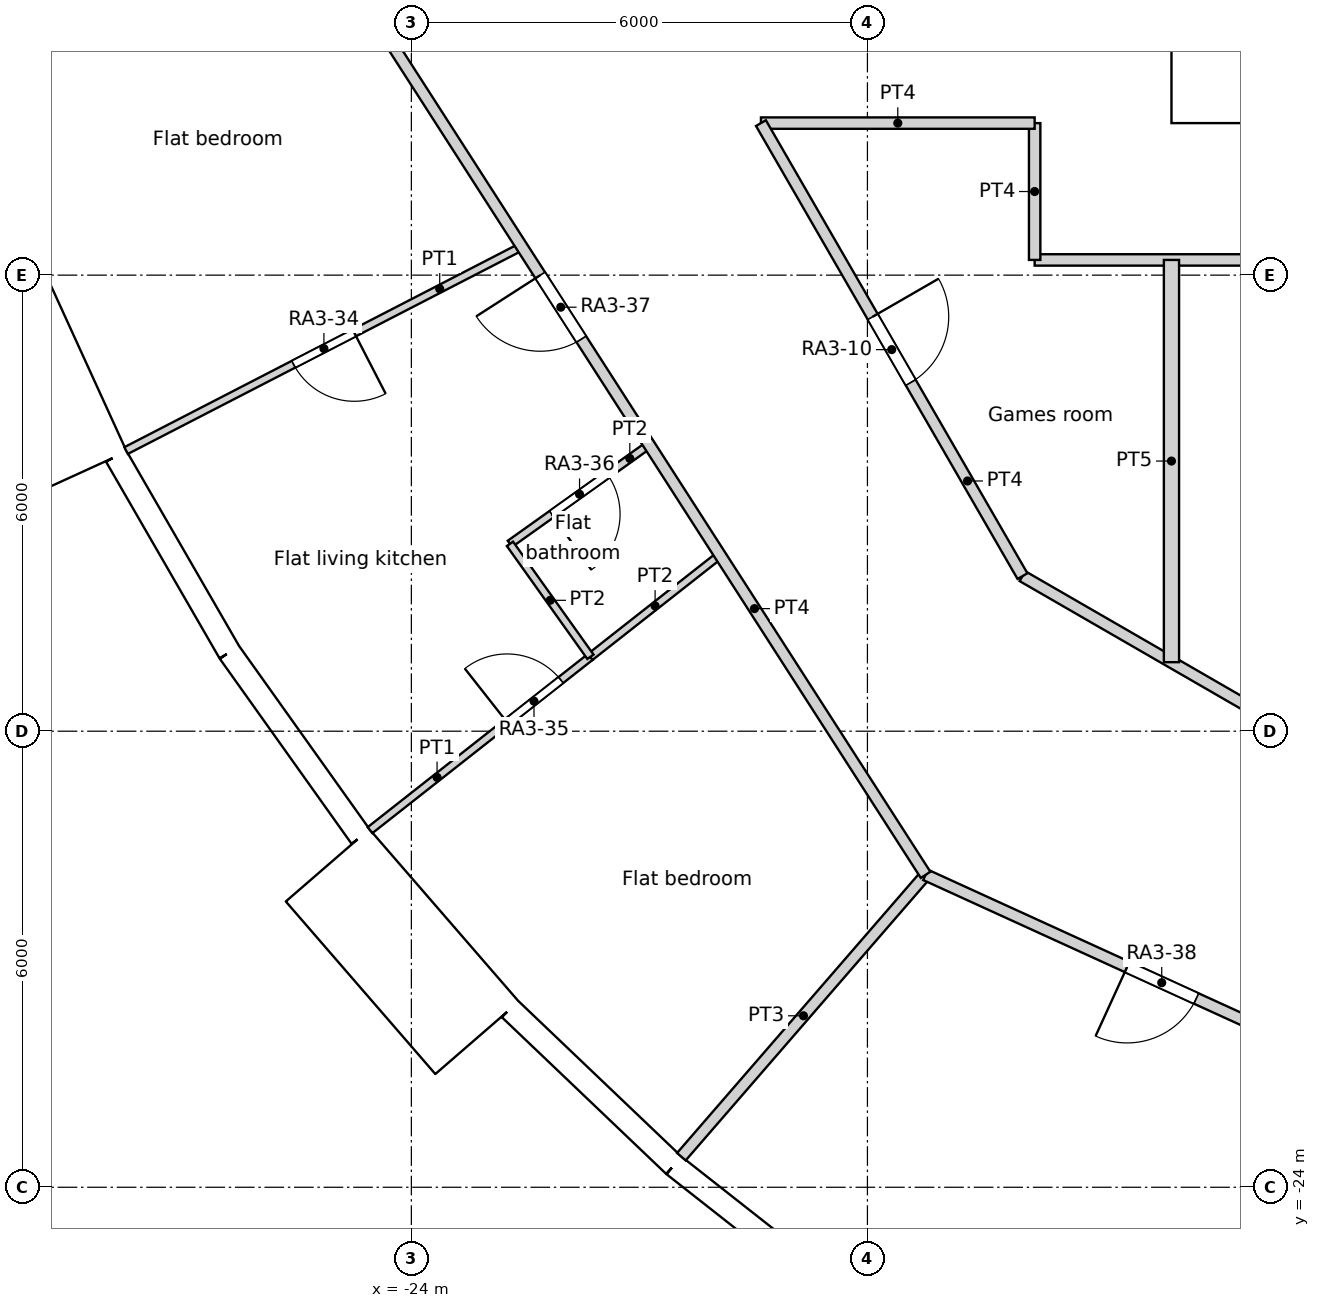
"""IFC4 building model, lengths in metres.
Left out: names, types, materials, properties, quantities, classifications, styles, units other than length and angle.
Written with IfcOpenShell. Run it as: python <this file> out.ifc"""

import sys

from ifc_helpers import new_model, si_unit, direction, frame, frame_2d, origin, origin_2d, place, context, subcontext, project, spatial, rectangle, circle, extrude, element, fill, save


model = new_model("IFC4")
c1 = context("Model", 3, precision=1e-05, world=origin(), true_north=direction((0.0, 1.0)))
c2 = subcontext(c1, "Body", "Model", "MODEL_VIEW")
j1 = project(units=[si_unit("LENGTHUNIT", "METRE"), si_unit("PLANEANGLEUNIT", "RADIAN")], contexts=[c1])
p1 = place(None, origin())
s1 = spatial("IfcSite", under=j1, at=p1, CompositionType="ELEMENT")
p2 = place(p1, origin())
s2 = spatial("IfcBuilding", under=s1, at=p2, CompositionType="ELEMENT")
p3 = place(p2, frame((0.0, 0.0, 49.8)))
s3 = spatial("IfcBuildingStorey", under=s2, at=p3, CompositionType="ELEMENT", Elevation=49.8)
for number, where, z_axis, x_axis in (
    (1, (-29.048, -8.529, 0.0), (0.0, 0.0, 1.0), (1.0, 0.0, 0.0)),
    (2, (-26.909, -13.873, 0.0), (0.0, 0.0, 1.0), (1.0, 0.0, 0.0)),
    (3, (-23.797, -18.715, 0.0), (0.0, 0.0, 1.0), (1.0, 0.0, 0.0)),
    (4, (-19.826, -22.88, 0.0), (0.0, 0.0, 1.0), (1.0, 0.0, 0.0)),
):
    element("IfcColumn", number, at=place(p3, frame(where, z_axis=z_axis, x_axis=x_axis)), inside=s3, PredefinedType="COLUMN", context=c2, shape_type="SweptSolid", body=[
        extrude(circle(Radius=0.7, at=origin_2d()), origin(), (0.0, 0.0, 1.0), 3.6),
    ])
for number, where, z_axis, x_axis in (
    (5, (-23.067, -8.396, 0.0), (0.0, 0.0, 1.0), (1.0, 0.0, 0.0)),
    (6, (-20.509, -13.489, 0.0), (0.0, 0.0, 1.0), (1.0, 0.0, 0.0)),
    (7, (-16.846, -17.855, 0.0), (0.0, 0.0, 1.0), (1.0, 0.0, 0.0)),
):
    element("IfcColumn", number, at=place(p3, frame(where, z_axis=z_axis, x_axis=x_axis)), inside=s3, PredefinedType="COLUMN", context=c2, shape_type="SweptSolid", body=[
        extrude(circle(Radius=0.75, at=origin_2d()), origin(), (0.0, 0.0, 1.0), 3.6),
    ])
p4 = place(p3, frame((-13.798, -12.802, 0.0), z_axis=(0.0, 0.0, 1.0), x_axis=(1.0, 0.0, 0.0)))
e8 = element("IfcColumn", 8, at=p4, inside=s3, PredefinedType="COLUMN", context=c2, shape_type="SweptSolid", body=[
    extrude(circle(Radius=0.8, at=origin_2d()), origin(), (0.0, 0.0, 1.0), 3.6),
])
p5 = place(p3, frame((-29.653, -11.893, -0.45), z_axis=(0.0, 0.0, 1.0), x_axis=(0.415427028395, -0.909626508012, 0.0)))
e9 = element("IfcWall", 9, at=p5, inside=s3, PredefinedType="ELEMENTEDWALL", context=c2, shape_type="SweptSolid", body=[
    extrude(rectangle(XDim=3.0, YDim=1.45, at=frame_2d((1.5, 0.0))), origin(), (0.0, 0.0, 1.0), 3.6),
])
p6 = place(p5, frame((1.5, 0.0, 2.0)))
e10 = element("IfcOpeningElement", 10, at=p6, cuts=e9, PredefinedType="OPENING", context=c2, shape_type="SweptSolid", body=[
    extrude(circle(Radius=0.9, at=origin_2d()), frame((0.0, 0.735, 0.0), z_axis=(0.0, -1.0, 0.0), x_axis=(1.0, 0.0, 0.0)), (0.0, 0.0, 1.0), 1.47),
])
p7 = place(p3, frame((-27.884, -14.382, 0.0), z_axis=(0.0, 0.0, 1.0), x_axis=(0.500025049464, -0.866010940986, 0.0)))
e11 = element("IfcWall", 11, at=p7, inside=s3, PredefinedType="SOLIDWALL", context=c2, shape_type="SweptSolid", body=[
    extrude(rectangle(XDim=2.98, YDim=0.3, at=frame_2d((1.49, 0.0))), origin(), (0.0, 0.0, 1.0), 3.15),
])
p8 = place(p7, frame((1.49, 0.0, 1.55)))
e12 = element("IfcOpeningElement", 12, at=p8, cuts=e11, PredefinedType="OPENING", context=c2, shape_type="SweptSolid", body=[
    extrude(circle(Radius=0.9, at=origin_2d()), frame((0.0, 0.16, 0.0), z_axis=(0.0, -1.0, 0.0), x_axis=(1.0, 0.0, 0.0)), (0.0, 0.0, 1.0), 0.32),
])
p9 = place(p3, frame((-26.394, -16.962, 0.0), z_axis=(0.0, 0.0, 1.0), x_axis=(0.580059407678, -0.81457417315, 0.0)))
e13 = element("IfcWall", 13, at=p9, inside=s3, PredefinedType="SOLIDWALL", context=c2, shape_type="SweptSolid", body=[
    extrude(rectangle(XDim=2.979, YDim=0.3, at=frame_2d((1.49, 0.0))), origin(), (0.0, 0.0, 1.0), 3.15),
])
p10 = place(p9, frame((1.49, 0.0, 1.55)))
e14 = element("IfcOpeningElement", 14, at=p10, cuts=e13, PredefinedType="OPENING", context=c2, shape_type="SweptSolid", body=[
    extrude(circle(Radius=0.9, at=origin_2d()), frame((0.0, 0.16, 0.0), z_axis=(0.0, -1.0, 0.0), x_axis=(1.0, 0.0, 0.0)), (0.0, 0.0, 1.0), 0.32),
])
p11 = place(p3, frame((-25.101, -19.766, -0.45), z_axis=(0.0, 0.0, 1.0), x_axis=(0.654890259022, -0.75572398972, 0.0)))
e15 = element("IfcWall", 15, at=p11, inside=s3, PredefinedType="ELEMENTEDWALL", context=c2, shape_type="SweptSolid", body=[
    extrude(rectangle(XDim=3.0, YDim=1.45, at=frame_2d((1.5, 0.0))), origin(), (0.0, 0.0, 1.0), 3.6),
])
p12 = place(p11, frame((1.5, 0.0, 2.0)))
e16 = element("IfcOpeningElement", 16, at=p12, cuts=e15, PredefinedType="OPENING", context=c2, shape_type="SweptSolid", body=[
    extrude(circle(Radius=0.9, at=origin_2d()), frame((0.0, 0.735, 0.0), z_axis=(0.0, -1.0, 0.0), x_axis=(1.0, 0.0, 0.0)), (0.0, 0.0, 1.0), 1.47),
])
p13 = place(p3, frame((-22.702, -21.655, 0.0), z_axis=(0.0, 0.0, 1.0), x_axis=(0.723744206617, -0.690068346896, 0.0)))
e17 = element("IfcWall", 17, at=p13, inside=s3, PredefinedType="SOLIDWALL", context=c2, shape_type="SweptSolid", body=[
    extrude(rectangle(XDim=2.98, YDim=0.3, at=frame_2d((1.49, 0.0))), origin(), (0.0, 0.0, 1.0), 3.15),
])
p14 = place(p13, frame((1.49, 0.0, 1.55)))
e18 = element("IfcOpeningElement", 18, at=p14, cuts=e17, PredefinedType="OPENING", context=c2, shape_type="SweptSolid", body=[
    extrude(circle(Radius=0.9, at=origin_2d()), frame((0.0, 0.16, 0.0), z_axis=(0.0, -1.0, 0.0), x_axis=(1.0, 0.0, 0.0)), (0.0, 0.0, 1.0), 0.32),
])
p15 = place(p3, frame((-20.546, -23.711, 0.0), z_axis=(0.0, 0.0, 1.0), x_axis=(0.786045331304, -0.618168858108, 0.0)))
e19 = element("IfcWall", 19, at=p15, inside=s3, PredefinedType="SOLIDWALL", context=c2, shape_type="SweptSolid", body=[
    extrude(rectangle(XDim=2.98, YDim=0.3, at=frame_2d((1.49, 0.0))), origin(), (0.0, 0.0, 1.0), 3.15),
])
p16 = place(p15, frame((1.49, 0.0, 1.55)))
e20 = element("IfcOpeningElement", 20, at=p16, cuts=e19, PredefinedType="OPENING", context=c2, shape_type="SweptSolid", body=[
    extrude(circle(Radius=0.9, at=origin_2d()), frame((0.0, 0.16, 0.0), z_axis=(0.0, -1.0, 0.0), x_axis=(1.0, 0.0, 0.0)), (0.0, 0.0, 1.0), 0.32),
])
p17 = place(p3, frame((-14.0, -9.4, 0.0), z_axis=(0.0, 0.0, 1.0), x_axis=(1.0, 0.0, 0.0)))
e21 = element("IfcWall", 21, at=p17, inside=s3, PredefinedType="SOLIDWALL", context=c2, shape_type="SweptSolid", body=[
    extrude(rectangle(XDim=28.0, YDim=1.2, at=frame_2d((14.0, 0.0))), origin(), (0.0, 0.0, 1.0), 3.6),
])
p18 = place(p17, frame((14.9, 0.0, 0.0)))
e22 = element("IfcOpeningElement", 22, at=p18, cuts=e21, PredefinedType="OPENING", context=c2, shape_type="SweptSolid", body=[
    extrude(rectangle(XDim=1.0, YDim=2.1, at=frame_2d((0.5, 1.05))), frame((0.0, 0.6, 0.0), z_axis=(0.0, -1.0, 0.0), x_axis=(1.0, 0.0, 0.0)), (0.0, 0.0, 1.0), 1.2),
])
p19 = place(p17, frame((9.8, 0.0, 0.0)))
e23 = element("IfcOpeningElement", 23, at=p19, cuts=e21, PredefinedType="OPENING", context=c2, shape_type="SweptSolid", body=[
    extrude(rectangle(XDim=1.8, YDim=2.1, at=frame_2d((0.9, 1.05))), frame((0.0, 0.6, 0.0), z_axis=(0.0, -1.0, 0.0), x_axis=(1.0, 0.0, 0.0)), (0.0, 0.0, 1.0), 1.2),
])
p20 = place(p17, frame((16.4, 0.0, 0.0)))
e24 = element("IfcOpeningElement", 24, at=p20, cuts=e21, PredefinedType="OPENING", context=c2, shape_type="SweptSolid", body=[
    extrude(rectangle(XDim=1.8, YDim=2.1, at=frame_2d((0.9, 1.05))), frame((0.0, 0.6, 0.0), z_axis=(0.0, -1.0, 0.0), x_axis=(1.0, 0.0, 0.0)), (0.0, 0.0, 1.0), 1.2),
])
p21 = place(p3, frame((-15.8, -11.8, 0.0), z_axis=(0.0, 0.0, 1.0), x_axis=(1.0, 0.0, 0.0)))
e25 = element("IfcWall", 25, at=p21, inside=s3, PredefinedType="PARTITIONING", context=c2, shape_type="SweptSolid", body=[
    extrude(rectangle(XDim=14.612, YDim=0.15, at=frame_2d((7.306, 0.0))), origin(), (0.0, 0.0, 1.0), 3.15),
])
p22 = place(p21, frame((7.729, 0.0, 0.0)))
e26 = element("IfcOpeningElement", 26, at=p22, cuts=e25, PredefinedType="OPENING", context=c2, shape_type="SweptSolid", body=[
    extrude(rectangle(XDim=0.95, YDim=2.1, at=frame_2d((0.475, 1.05))), frame((0.0, 0.075, 0.0), z_axis=(0.0, -1.0, 0.0), x_axis=(1.0, 0.0, 0.0)), (0.0, 0.0, 1.0), 0.15),
])
p23 = place(p3, frame((-15.8, -11.8, 0.0), z_axis=(0.0, 0.0, 1.0), x_axis=(0.0, 1.0, 0.0)))
e27 = element("IfcWall", 27, at=p23, inside=s3, PredefinedType="PARTITIONING", context=c2, shape_type="SweptSolid", body=[
    extrude(rectangle(XDim=1.8, YDim=0.15, at=frame_2d((0.9, 0.0))), origin(), (0.0, 0.0, 1.0), 3.15),
])
p24 = place(p3, frame((-19.401, -10.0, 0.0), z_axis=(0.0, 0.0, 1.0), x_axis=(1.0, 0.0, 0.0)))
e28 = element("IfcWall", 28, at=p24, inside=s3, PredefinedType="PARTITIONING", context=c2, shape_type="SweptSolid", body=[
    extrude(rectangle(XDim=3.601, YDim=0.15, at=frame_2d((1.8, 0.0))), origin(), (0.0, 0.0, 1.0), 3.15),
])
p25 = place(p3, frame((-19.401, -10.0, 0.0), z_axis=(0.0, 0.0, 1.0), x_axis=(0.499992689227, -0.86602962462, 0.0)))
e29 = element("IfcWall", 29, at=p25, inside=s3, PredefinedType="PARTITIONING", context=c2, shape_type="SweptSolid", body=[
    extrude(rectangle(XDim=6.882, YDim=0.15, at=frame_2d((3.441, 0.0))), origin(), (0.0, 0.0, 1.0), 3.15),
])
p26 = place(p25, frame((2.941, 0.0, 0.0)))
e30 = element("IfcOpeningElement", 30, at=p26, cuts=e29, PredefinedType="OPENING", context=c2, shape_type="SweptSolid", body=[
    extrude(rectangle(XDim=1.0, YDim=2.04, at=frame_2d((0.5, 1.02))), frame((0.0, 0.075, 0.0), z_axis=(0.0, -1.0, 0.0), x_axis=(1.0, 0.0, 0.0)), (0.0, 0.0, 1.0), 0.15),
])
p27 = place(p3, frame((-25.253, -7.415, 0.0), z_axis=(0.0, 0.0, 1.0), x_axis=(0.540667724156, -0.841236240337, 0.0)))
e31 = element("IfcWall", 31, at=p27, inside=s3, PredefinedType="PARTITIONING", context=c2, shape_type="SweptSolid", body=[
    extrude(rectangle(XDim=14.83, YDim=0.15, at=frame_2d((7.415, 0.0))), origin(), (0.0, 0.0, 1.0), 3.15),
])
p28 = place(p27, frame((5.452, 0.0, 0.0)))
e32 = element("IfcOpeningElement", 32, at=p28, cuts=e31, PredefinedType="OPENING", context=c2, shape_type="SweptSolid", body=[
    extrude(rectangle(XDim=1.0, YDim=2.1, at=frame_2d((0.5, 1.05))), frame((0.0, 0.075, 0.0), z_axis=(0.0, -1.0, 0.0), x_axis=(1.0, 0.0, 0.0)), (0.0, 0.0, 1.0), 0.15),
])
p29 = place(p3, frame((-15.96, -15.96, 0.0), z_axis=(0.0, 0.0, 1.0), x_axis=(0.866022730501, -0.500004630234, 0.0)))
e33 = element("IfcWall", 33, at=p29, inside=s3, PredefinedType="PARTITIONING", context=c2, shape_type="SweptSolid", body=[
    extrude(rectangle(XDim=11.684, YDim=0.15, at=frame_2d((5.842, 0.0))), origin(), (0.0, 0.0, 1.0), 3.15),
])
p30 = place(p3, frame((-17.235, -19.89, 0.0), z_axis=(0.0, 0.0, 1.0), x_axis=(0.909617953634, -0.415445758705, 0.0)))
e34 = element("IfcWall", 34, at=p30, inside=s3, PredefinedType="PARTITIONING", context=c2, shape_type="SweptSolid", body=[
    extrude(rectangle(XDim=14.83, YDim=0.15, at=frame_2d((7.415, 0.0))), origin(), (0.0, 0.0, 1.0), 3.15),
])
p31 = place(p30, frame((2.916, 0.0, 0.0)))
e35 = element("IfcOpeningElement", 35, at=p31, cuts=e34, PredefinedType="OPENING", context=c2, shape_type="SweptSolid", body=[
    extrude(rectangle(XDim=1.0, YDim=2.04, at=frame_2d((0.5, 1.02))), frame((0.0, 0.075, 0.0), z_axis=(0.0, -1.0, 0.0), x_axis=(1.0, 0.0, 0.0)), (0.0, 0.0, 1.0), 0.15),
])
p32 = place(p3, frame((-14.0, -17.092, 0.0), z_axis=(0.0, 0.0, 1.0), x_axis=(0.0, 1.0, 0.0)))
e36 = element("IfcWall", 36, at=p32, inside=s3, PredefinedType="PARTITIONING", context=c2, shape_type="SweptSolid", body=[
    extrude(rectangle(XDim=5.292, YDim=0.2, at=frame_2d((2.646, 0.0))), origin(), (0.0, 0.0, 1.0), 3.15),
])
p33 = place(p3, frame((-27.753, -14.308, 0.0), z_axis=(0.0, 0.0, 1.0), x_axis=(0.88877955153, 0.45833493079, 0.0)))
e37 = element("IfcWall", 37, at=p33, inside=s3, PredefinedType="PARTITIONING", context=c2, shape_type="SweptSolid", body=[
    extrude(rectangle(XDim=5.856, YDim=0.1, at=frame_2d((2.928, 0.0))), origin(), (0.0, 0.0, 1.0), 3.15),
])
p34 = place(p33, frame((2.478, 0.0, 0.0)))
e38 = element("IfcOpeningElement", 38, at=p34, cuts=e37, PredefinedType="OPENING", context=c2, shape_type="SweptSolid", body=[
    extrude(rectangle(XDim=0.9, YDim=2.1, at=frame_2d((0.45, 1.05))), frame((0.0, 0.05, 0.0), z_axis=(0.0, -1.0, 0.0), x_axis=(1.0, 0.0, 0.0)), (0.0, 0.0, 1.0), 0.1),
])
p35 = place(p3, frame((-24.544, -19.302, 0.0), z_axis=(0.0, 0.0, 1.0), x_axis=(0.785987576403, 0.618242290481, 0.0)))
e39 = element("IfcWall", 39, at=p35, inside=s3, PredefinedType="PARTITIONING", context=c2, shape_type="SweptSolid", body=[
    extrude(rectangle(XDim=3.689, YDim=0.1, at=frame_2d((1.845, 0.0))), origin(), (0.0, 0.0, 1.0), 3.15),
])
p36 = place(p35, frame((2.295, 0.0, 0.0)))
e40 = element("IfcOpeningElement", 40, at=p36, cuts=e39, PredefinedType="OPENING", context=c2, shape_type="SweptSolid", body=[
    extrude(rectangle(XDim=0.9, YDim=2.1, at=frame_2d((0.45, 1.05))), frame((0.0, 0.05, 0.0), z_axis=(0.0, -1.0, 0.0), x_axis=(1.0, 0.0, 0.0)), (0.0, 0.0, 1.0), 0.1),
])
p37 = place(p3, frame((-22.703, -15.535, 0.0), z_axis=(0.0, 0.0, 1.0), x_axis=(0.814525331415, 0.580127989743, 0.0)))
e41 = element("IfcWall", 41, at=p37, inside=s3, PredefinedType="PARTITIONING", context=c2, shape_type="SweptSolid", body=[
    extrude(rectangle(XDim=2.248, YDim=0.1, at=frame_2d((1.124, 0.0))), origin(), (0.0, 0.0, 1.0), 3.15),
])
p38 = place(p37, frame((0.674, 0.0, 0.0)))
e42 = element("IfcOpeningElement", 42, at=p38, cuts=e41, PredefinedType="OPENING", context=c2, shape_type="SweptSolid", body=[
    extrude(rectangle(XDim=0.9, YDim=2.0, at=frame_2d((0.45, 1.0))), frame((0.0, 0.05, 0.0), z_axis=(0.0, -1.0, 0.0), x_axis=(1.0, 0.0, 0.0)), (0.0, 0.0, 1.0), 0.1),
])
p39 = place(p3, frame((-22.703, -15.535, 0.0), z_axis=(0.0, 0.0, 1.0), x_axis=(0.580275898497, -0.814419966371, 0.0)))
e43 = element("IfcWall", 43, at=p39, inside=s3, PredefinedType="PARTITIONING", context=c2, shape_type="SweptSolid", body=[
    extrude(rectangle(XDim=1.825, YDim=0.1, at=frame_2d((0.912, 0.0))), origin(), (0.0, 0.0, 1.0), 3.15),
])
p40 = place(p3, frame((-21.647, -17.023, 0.0), z_axis=(0.0, 0.0, 1.0), x_axis=(0.786138836794, 0.618049940769, 0.0)))
e44 = element("IfcWall", 44, at=p40, inside=s3, PredefinedType="PARTITIONING", context=c2, shape_type="SweptSolid", body=[
    extrude(rectangle(XDim=2.171, YDim=0.1, at=frame_2d((1.086, 0.0))), origin(), (0.0, 0.0, 1.0), 3.15),
])
p41 = place(p3, frame((-20.448, -23.598, 0.0), z_axis=(0.0, 0.0, 1.0), x_axis=(0.654847179409, 0.755761319214, 0.0)))
e45 = element("IfcWall", 45, at=p41, inside=s3, PredefinedType="PARTITIONING", context=c2, shape_type="SweptSolid", body=[
    extrude(rectangle(XDim=4.906, YDim=0.15, at=frame_2d((2.453, 0.0))), origin(), (0.0, 0.0, 1.0), 3.15),
])
p42 = place(p6, origin())
e46 = element("IfcWindow", 46, at=p42, inside=s3, PartitioningType="SINGLE_PANEL", PredefinedType="WINDOW", context=c2, shape_type="SweptSolid", body=[
    extrude(circle(Radius=0.9, at=origin_2d()), frame((0.0, 0.695, 0.0), z_axis=(0.0, -1.0, 0.0), x_axis=(1.0, 0.0, 0.0)), (0.0, 0.0, 1.0), 0.1),
])
fill(e10, e46)
p43 = place(p8, origin())
e47 = element("IfcWindow", 47, at=p43, inside=s3, PartitioningType="SINGLE_PANEL", PredefinedType="WINDOW", context=c2, shape_type="SweptSolid", body=[
    extrude(circle(Radius=0.9, at=origin_2d()), frame((0.0, 0.12, 0.0), z_axis=(0.0, -1.0, 0.0), x_axis=(1.0, 0.0, 0.0)), (0.0, 0.0, 1.0), 0.1),
])
fill(e12, e47)
p44 = place(p10, origin())
e48 = element("IfcWindow", 48, at=p44, inside=s3, PartitioningType="SINGLE_PANEL", PredefinedType="WINDOW", context=c2, shape_type="SweptSolid", body=[
    extrude(circle(Radius=0.9, at=origin_2d()), frame((0.0, 0.12, 0.0), z_axis=(0.0, -1.0, 0.0), x_axis=(1.0, 0.0, 0.0)), (0.0, 0.0, 1.0), 0.1),
])
fill(e14, e48)
p45 = place(p12, origin())
e49 = element("IfcWindow", 49, at=p45, inside=s3, PartitioningType="SINGLE_PANEL", PredefinedType="WINDOW", context=c2, shape_type="SweptSolid", body=[
    extrude(circle(Radius=0.9, at=origin_2d()), frame((0.0, 0.695, 0.0), z_axis=(0.0, -1.0, 0.0), x_axis=(1.0, 0.0, 0.0)), (0.0, 0.0, 1.0), 0.1),
])
fill(e16, e49)
p46 = place(p14, origin())
e50 = element("IfcWindow", 50, at=p46, inside=s3, PartitioningType="SINGLE_PANEL", PredefinedType="WINDOW", context=c2, shape_type="SweptSolid", body=[
    extrude(circle(Radius=0.9, at=origin_2d()), frame((0.0, 0.12, 0.0), z_axis=(0.0, -1.0, 0.0), x_axis=(1.0, 0.0, 0.0)), (0.0, 0.0, 1.0), 0.1),
])
fill(e18, e50)
p47 = place(p16, origin())
e51 = element("IfcWindow", 51, at=p47, inside=s3, PartitioningType="SINGLE_PANEL", PredefinedType="WINDOW", context=c2, shape_type="SweptSolid", body=[
    extrude(circle(Radius=0.9, at=origin_2d()), frame((0.0, 0.12, 0.0), z_axis=(0.0, -1.0, 0.0), x_axis=(1.0, 0.0, 0.0)), (0.0, 0.0, 1.0), 0.1),
])
fill(e20, e51)
p48 = place(p26, origin())
e52 = element("IfcDoor", 52, at=p48, inside=s3, OperationType="SINGLE_SWING_LEFT", PredefinedType="DOOR", context=c2, shape_type="SweptSolid", body=[
    extrude(rectangle(XDim=1.0, YDim=2.04, at=frame_2d((0.5, 1.02))), frame((0.0, 0.025, 0.0), z_axis=(0.0, -1.0, 0.0), x_axis=(1.0, 0.0, 0.0)), (0.0, 0.0, 1.0), 0.05),
])
fill(e30, e52)
p49 = place(p34, origin())
e53 = element("IfcDoor", 53, at=p49, inside=s3, OperationType="SINGLE_SWING_LEFT", PredefinedType="DOOR", context=c2, shape_type="SweptSolid", body=[
    extrude(rectangle(XDim=0.9, YDim=2.1, at=frame_2d((0.45, 1.05))), frame((0.0, 0.025, 0.0), z_axis=(0.0, -1.0, 0.0), x_axis=(1.0, 0.0, 0.0)), (0.0, 0.0, 1.0), 0.05),
])
fill(e38, e53)
p50 = place(p36, origin())
e54 = element("IfcDoor", 54, at=p50, inside=s3, OperationType="SINGLE_SWING_LEFT", PredefinedType="DOOR", context=c2, shape_type="SweptSolid", body=[
    extrude(rectangle(XDim=0.9, YDim=2.1, at=frame_2d((0.45, 1.05))), frame((0.0, 0.025, 0.0), z_axis=(0.0, -1.0, 0.0), x_axis=(1.0, 0.0, 0.0)), (0.0, 0.0, 1.0), 0.05),
])
fill(e40, e54)
p51 = place(p38, origin())
e55 = element("IfcDoor", 55, at=p51, inside=s3, OperationType="SINGLE_SWING_RIGHT", PredefinedType="DOOR", context=c2, shape_type="SweptSolid", body=[
    extrude(rectangle(XDim=0.9, YDim=2.0, at=frame_2d((0.45, 1.0))), frame((0.0, 0.025, 0.0), z_axis=(0.0, -1.0, 0.0), x_axis=(1.0, 0.0, 0.0)), (0.0, 0.0, 1.0), 0.05),
])
fill(e42, e55)
p52 = place(p28, origin())
e56 = element("IfcDoor", 56, at=p52, inside=s3, OperationType="SINGLE_SWING_RIGHT", PredefinedType="DOOR", context=c2, shape_type="SweptSolid", body=[
    extrude(rectangle(XDim=1.0, YDim=2.1, at=frame_2d((0.5, 1.05))), frame((0.0, 0.025, 0.0), z_axis=(0.0, -1.0, 0.0), x_axis=(1.0, 0.0, 0.0)), (0.0, 0.0, 1.0), 0.05),
])
fill(e32, e56)
p53 = place(p31, origin())
e57 = element("IfcDoor", 57, at=p53, inside=s3, OperationType="SINGLE_SWING_RIGHT", PredefinedType="DOOR", context=c2, shape_type="SweptSolid", body=[
    extrude(rectangle(XDim=1.0, YDim=2.04, at=frame_2d((0.5, 1.02))), frame((0.0, 0.025, 0.0), z_axis=(0.0, -1.0, 0.0), x_axis=(1.0, 0.0, 0.0)), (0.0, 0.0, 1.0), 0.05),
])
fill(e35, e57)
save(model, sys.argv[1])
